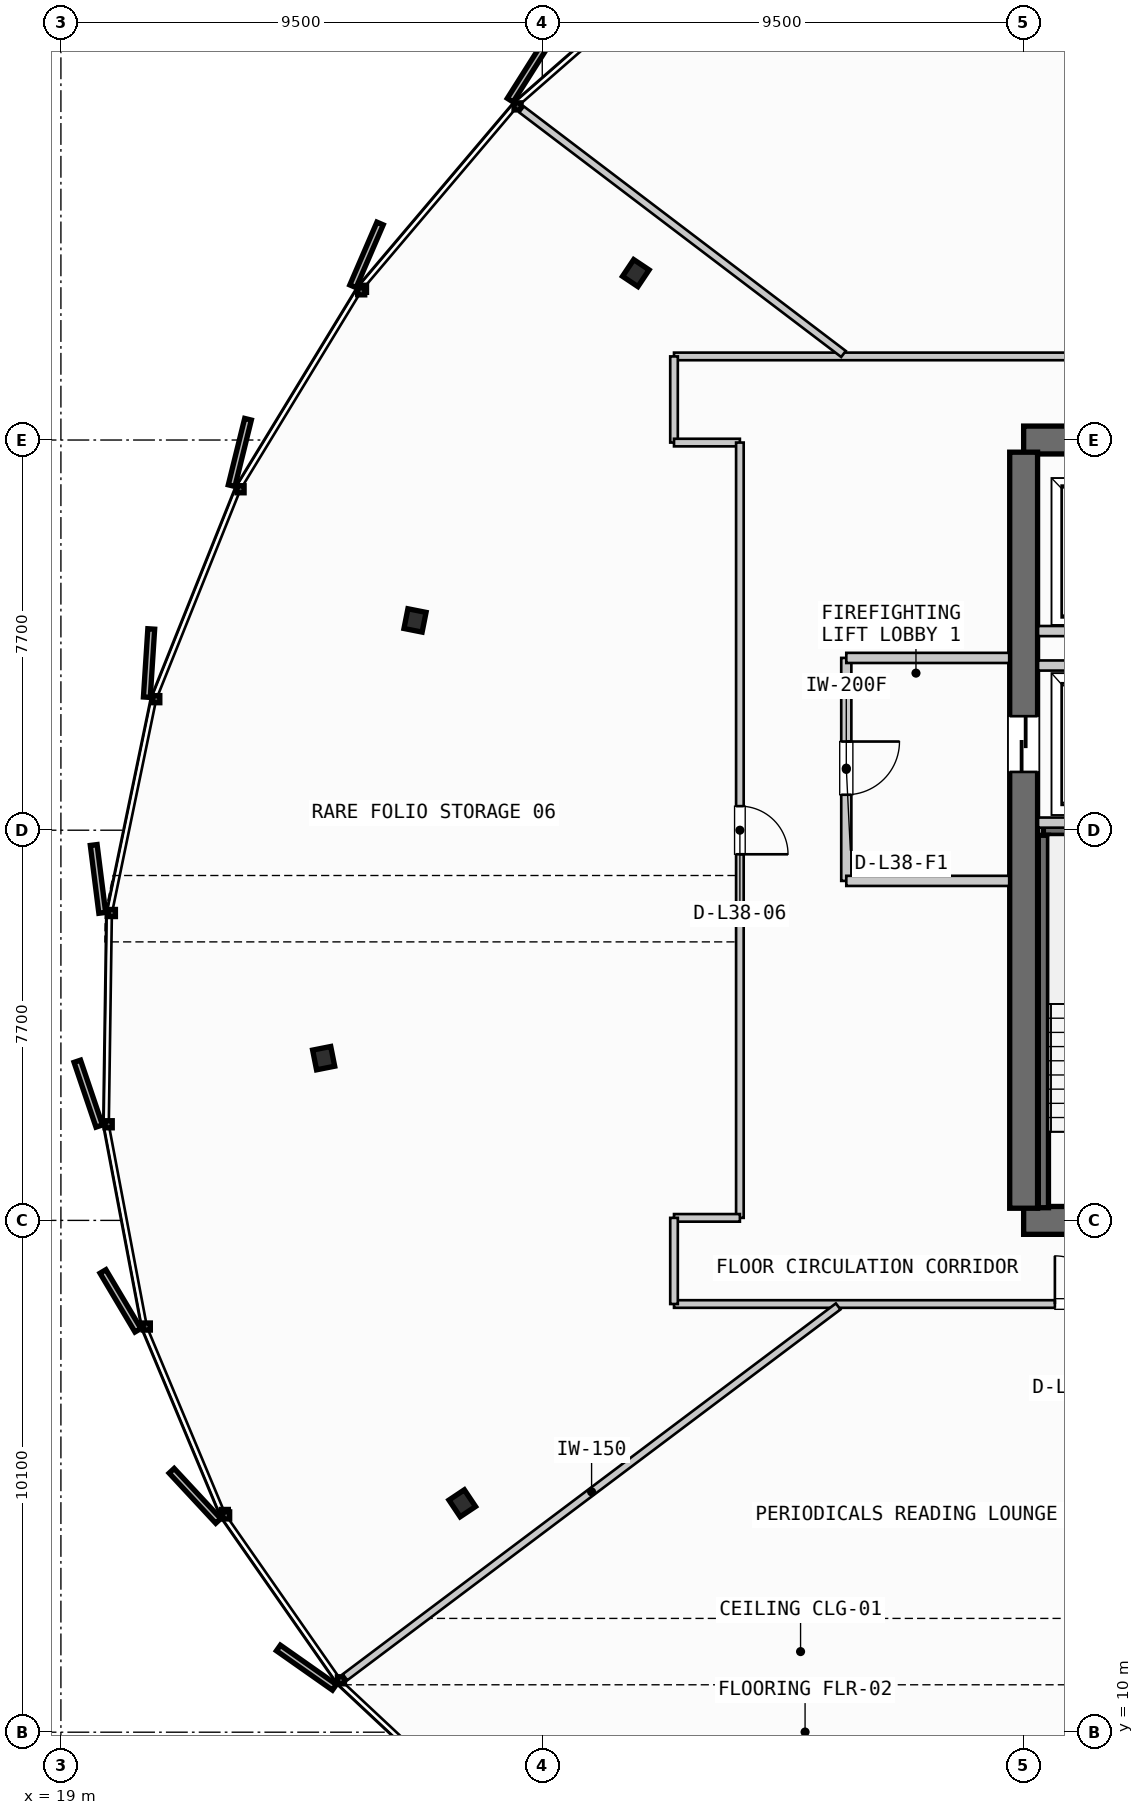
"""IFC4 building model, lengths in metres.
Left out: names, types, materials, properties, quantities, classifications, styles, units other than length and angle.
Written with IfcOpenShell. Run it as: python <this file> out.ifc"""

import sys

from ifc_helpers import new_model, si_unit, direction, frame, frame_2d, origin, origin_2d, place, context, subcontext, project, spatial, rectangle, i_section, extrude, source, transform, mapped, element, fill, save


model = new_model("IFC4")
c1 = context("Model", 3, precision=1e-05, world=origin(), true_north=direction((0.0, 1.0)))
c2 = subcontext(c1, "Body", "Model", "MODEL_VIEW")
j1 = project(units=[si_unit("LENGTHUNIT", "METRE"), si_unit("PLANEANGLEUNIT", "RADIAN")], contexts=[c1])
p1 = place(None, origin())
s1 = spatial("IfcSite", under=j1, at=p1, CompositionType="ELEMENT")
p2 = place(p1, origin())
s2 = spatial("IfcBuilding", under=s1, at=p2, CompositionType="ELEMENT")
p3 = place(p2, frame((0.0, 0.0, 150.1)))
s3 = spatial("IfcBuildingStorey", under=s2, at=p3, CompositionType="ELEMENT", Elevation=150.1)
p4 = place(p3, frame((38.0, 20.1, 0.0), z_axis=(0.0, 0.0, 1.0), x_axis=(1.0, 0.0, 0.0)))
e1 = element("IfcWall", 1, at=p4, inside=s3, PredefinedType="SHEAR", context=c2, shape_type="SweptSolid", body=[
    extrude(rectangle(XDim=17.6, YDim=0.55, at=frame_2d((8.8, 0.0))), origin(), (0.0, 0.0, 1.0), 3.3),
])
p5 = place(p4, frame((1.4, 0.0, 0.0)))
e2 = element("IfcOpeningElement", 2, at=p5, cuts=e1, PredefinedType="OPENING", context=c2, shape_type="SweptSolid", body=[
    extrude(rectangle(XDim=1.05, YDim=2.15, at=frame_2d((0.525, 1.075))), frame((0.0, 0.285, 0.0), z_axis=(0.0, -1.0, 0.0), x_axis=(1.0, 0.0, 0.0)), (0.0, 0.0, 1.0), 0.57),
])
p6 = place(p4, frame((15.15, 0.0, 0.0)))
e3 = element("IfcOpeningElement", 3, at=p6, cuts=e1, PredefinedType="OPENING", context=c2, shape_type="SweptSolid", body=[
    extrude(rectangle(XDim=1.05, YDim=2.15, at=frame_2d((0.525, 1.075))), frame((0.0, 0.285, 0.0), z_axis=(0.0, -1.0, 0.0), x_axis=(1.0, 0.0, 0.0)), (0.0, 0.0, 1.0), 0.57),
])
p7 = place(p4, frame((5.25, 0.0, 0.0)))
e4 = element("IfcOpeningElement", 4, at=p7, cuts=e1, PredefinedType="OPENING", context=c2, shape_type="SweptSolid", body=[
    extrude(rectangle(XDim=0.9, YDim=2.15, at=frame_2d((0.45, 1.075))), frame((0.0, 0.285, 0.0), z_axis=(0.0, -1.0, 0.0), x_axis=(1.0, 0.0, 0.0)), (0.0, 0.0, 1.0), 0.57),
])
p8 = place(p4, frame((11.4, 0.0, 0.0)))
e5 = element("IfcOpeningElement", 5, at=p8, cuts=e1, PredefinedType="OPENING", context=c2, shape_type="SweptSolid", body=[
    extrude(rectangle(XDim=0.95, YDim=2.15, at=frame_2d((0.475, 1.075))), frame((0.0, 0.285, 0.0), z_axis=(0.0, -1.0, 0.0), x_axis=(1.0, 0.0, 0.0)), (0.0, 0.0, 1.0), 0.57),
])
p9 = place(p3, frame((55.6, 35.5, 0.0), z_axis=(0.0, 0.0, 1.0), x_axis=(-1.0, 0.0, 0.0)))
e6 = element("IfcWall", 6, at=p9, inside=s3, PredefinedType="SHEAR", context=c2, shape_type="SweptSolid", body=[
    extrude(rectangle(XDim=17.6, YDim=0.55, at=frame_2d((8.8, 0.0))), origin(), (0.0, 0.0, 1.0), 3.3),
])
p10 = place(p9, frame((8.05, 0.0, 0.0)))
e7 = element("IfcOpeningElement", 7, at=p10, cuts=e6, PredefinedType="OPENING", context=c2, shape_type="SweptSolid", body=[
    extrude(rectangle(XDim=1.5, YDim=2.2, at=frame_2d((0.75, 1.1))), frame((0.0, 0.285, 0.0), z_axis=(0.0, -1.0, 0.0), x_axis=(1.0, 0.0, 0.0)), (0.0, 0.0, 1.0), 0.57),
])
p11 = place(p9, frame((14.95, 0.0, 0.0)))
e8 = element("IfcOpeningElement", 8, at=p11, cuts=e6, PredefinedType="OPENING", context=c2, shape_type="SweptSolid", body=[
    extrude(rectangle(XDim=1.4, YDim=2.3, at=frame_2d((0.7, 1.15))), frame((0.0, 0.285, 0.0), z_axis=(0.0, -1.0, 0.0), x_axis=(1.0, 0.0, 0.0)), (0.0, 0.0, 1.0), 0.57),
])
p12 = place(p9, frame((12.9, 0.0, 0.0)))
e9 = element("IfcOpeningElement", 9, at=p12, cuts=e6, PredefinedType="OPENING", context=c2, shape_type="SweptSolid", body=[
    extrude(rectangle(XDim=0.9, YDim=2.15, at=frame_2d((0.45, 1.075))), frame((0.0, 0.285, 0.0), z_axis=(0.0, -1.0, 0.0), x_axis=(1.0, 0.0, 0.0)), (0.0, 0.0, 1.0), 0.57),
])
p13 = place(p9, frame((10.6, 0.0, 0.0)))
e10 = element("IfcOpeningElement", 10, at=p13, cuts=e6, PredefinedType="OPENING", context=c2, shape_type="SweptSolid", body=[
    extrude(rectangle(XDim=0.95, YDim=2.15, at=frame_2d((0.475, 1.075))), frame((0.0, 0.285, 0.0), z_axis=(0.0, -1.0, 0.0), x_axis=(1.0, 0.0, 0.0)), (0.0, 0.0, 1.0), 0.57),
])
p14 = place(p3, frame((38.0, 35.26, 0.0), z_axis=(0.0, 0.0, 1.0), x_axis=(0.0, -1.0, 0.0)))
e11 = element("IfcWall", 11, at=p14, inside=s3, PredefinedType="SHEAR", context=c2, shape_type="SweptSolid", body=[
    extrude(rectangle(XDim=14.92, YDim=0.55, at=frame_2d((7.46, 0.0))), origin(), (0.0, 0.0, 1.0), 3.3),
])
p15 = place(p14, frame((5.21, 0.0, 0.0)))
e12 = element("IfcOpeningElement", 12, at=p15, cuts=e11, PredefinedType="OPENING", context=c2, shape_type="SweptSolid", body=[
    extrude(rectangle(XDim=1.1, YDim=2.2, at=frame_2d((0.55, 1.1))), frame((0.0, 0.285, 0.0), z_axis=(0.0, -1.0, 0.0), x_axis=(1.0, 0.0, 0.0)), (0.0, 0.0, 1.0), 0.57),
])
m1 = source(origin(), c2, "Body", "SweptSolid", [
    extrude(i_section(OverallWidth=0.397, OverallDepth=0.365, WebThickness=0.028, FlangeThickness=0.044, FilletRadius=0.015, at=origin_2d()), origin(), (0.0, 0.0, 1.0), 3.3),
])
for number, where, z_axis, x_axis in (
    (13, (30.346, 38.794, 0.0), (0.0, 0.0, 1.0), (-0.831, 0.556, 0.0)),
    (14, (25.989, 31.94, 0.0), (0.0, 0.0, 1.0), (-0.981, 0.195, 0.0)),
    (15, (24.185, 23.302, 0.0), (0.0, 0.0, 1.0), (-0.981, -0.195, 0.0)),
    (16, (26.921, 14.517, 0.0), (0.0, 0.0, 1.0), (-0.831, -0.556, 0.0)),
):
    element("IfcColumn", number, at=place(p3, frame(where, z_axis=z_axis, x_axis=x_axis)), inside=s3, PredefinedType="COLUMN", context=c2, shape_type="MappedRepresentation", body=[
        mapped(m1, transform((0.0, 0.0, 0.0), scale=1.0)),
    ])
p16 = place(p3, frame((38.39, 27.8, 0.0), z_axis=(0.0, 0.0, 1.0), x_axis=(1.0, 0.0, 0.0)))
e17 = element("IfcWall", 17, at=p16, inside=s3, PredefinedType="SHEAR", context=c2, shape_type="SweptSolid", body=[
    extrude(rectangle(XDim=3.06, YDim=0.2, at=frame_2d((1.53, 0.0))), origin(), (0.0, 0.0, 1.0), 3.3),
])
p17 = place(p3, frame((38.39, 20.35, 0.0), z_axis=(0.0, 0.0, 1.0), x_axis=(0.0, 1.0, 0.0)))
e18 = element("IfcWall", 18, at=p17, inside=s3, PredefinedType="SHEAR", context=c2, shape_type="SweptSolid", body=[
    extrude(rectangle(XDim=7.35, YDim=0.2, at=frame_2d((3.675, 0.0))), origin(), (0.0, 0.0, 1.0), 3.3),
])
for number, where, z_axis, x_axis in (
    (19, (38.285, 27.95, 0.0), (0.0, 0.0, 1.0), (1.0, 0.0, 0.0)),
    (20, (38.285, 31.05, 0.0), (0.0, 0.0, 1.0), (1.0, 0.0, 0.0)),
):
    element("IfcWall", number, at=place(p3, frame(where, z_axis=z_axis, x_axis=x_axis)), inside=s3, PredefinedType="PARTITIONING", context=c2, shape_type="SweptSolid", body=[
        extrude(rectangle(XDim=2.865, YDim=0.2, at=frame_2d((1.433, 0.0))), origin(), (0.0, 0.0, 1.0), 2.28),
    ])
p18 = place(p3, frame((34.5, 31.2, 0.0), z_axis=(0.0, 0.0, 1.0), x_axis=(0.0, -1.0, 0.0)))
e21 = element("IfcWall", 21, at=p18, inside=s3, PredefinedType="PARTITIONING", context=c2, shape_type="SweptSolid", body=[
    extrude(rectangle(XDim=4.4, YDim=0.2, at=frame_2d((2.2, 0.0))), origin(), (0.0, 0.0, 1.0), 2.28),
])
p19 = place(p18, frame((1.65, 0.0, 0.0)))
e22 = element("IfcOpeningElement", 22, at=p19, cuts=e21, PredefinedType="OPENING", context=c2, shape_type="SweptSolid", body=[
    extrude(rectangle(XDim=1.05, YDim=2.15, at=frame_2d((0.525, 1.075))), frame((0.0, 0.11, 0.0), z_axis=(0.0, -1.0, 0.0), x_axis=(1.0, 0.0, 0.0)), (0.0, 0.0, 1.0), 0.22),
])
for number, where, z_axis, x_axis in (
    (23, (34.5, 26.8, 0.0), (0.0, 0.0, 1.0), (1.0, 0.0, 0.0)),
    (24, (34.5, 31.2, 0.0), (0.0, 0.0, 1.0), (1.0, 0.0, 0.0)),
):
    element("IfcWall", number, at=place(p3, frame(where, z_axis=z_axis, x_axis=x_axis)), inside=s3, PredefinedType="PARTITIONING", context=c2, shape_type="SweptSolid", body=[
        extrude(rectangle(XDim=3.215, YDim=0.2, at=frame_2d((1.607, 0.0))), origin(), (0.0, 0.0, 1.0), 2.28),
    ])
p20 = place(p3, frame((38.285, 31.73, 0.0), z_axis=(0.0, 0.0, 1.0), x_axis=(1.0, 0.0, 0.0)))
e25 = element("IfcWall", 25, at=p20, inside=s3, PredefinedType="PARTITIONING", context=c2, shape_type="SweptSolid", body=[
    extrude(rectangle(XDim=7.515, YDim=0.2, at=frame_2d((3.758, 0.0))), origin(), (0.0, 0.0, 1.0), 2.28),
])
p21 = place(p3, frame((31.1, 18.45, 0.0), z_axis=(0.0, 0.0, 1.0), x_axis=(1.0, 0.0, 0.0)))
e26 = element("IfcWall", 26, at=p21, inside=s3, PredefinedType="PARTITIONING", context=c2, shape_type="SweptSolid", body=[
    extrude(rectangle(XDim=31.4, YDim=0.15, at=frame_2d((15.7, 0.0))), origin(), (0.0, 0.0, 1.0), 2.28),
])
p22 = place(p21, frame((7.517, 0.0, 0.0)))
e27 = element("IfcOpeningElement", 27, at=p22, cuts=e26, PredefinedType="OPENING", context=c2, shape_type="SweptSolid", body=[
    extrude(rectangle(XDim=0.95, YDim=2.15, at=frame_2d((0.475, 1.075))), frame((0.0, 0.085, 0.0), z_axis=(0.0, -1.0, 0.0), x_axis=(1.0, 0.0, 0.0)), (0.0, 0.0, 1.0), 0.17),
])
p23 = place(p21, frame((20.149, 0.0, 0.0)))
e28 = element("IfcOpeningElement", 28, at=p23, cuts=e26, PredefinedType="OPENING", context=c2, shape_type="SweptSolid", body=[
    extrude(rectangle(XDim=0.95, YDim=2.15, at=frame_2d((0.475, 1.075))), frame((0.0, 0.085, 0.0), z_axis=(0.0, -1.0, 0.0), x_axis=(1.0, 0.0, 0.0)), (0.0, 0.0, 1.0), 0.17),
])
p24 = place(p3, frame((62.5, 37.15, 0.0), z_axis=(0.0, 0.0, 1.0), x_axis=(-1.0, 0.0, 0.0)))
e29 = element("IfcWall", 29, at=p24, inside=s3, PredefinedType="PARTITIONING", context=c2, shape_type="SweptSolid", body=[
    extrude(rectangle(XDim=31.4, YDim=0.15, at=frame_2d((15.7, 0.0))), origin(), (0.0, 0.0, 1.0), 2.28),
])
p25 = place(p24, frame((7.179, 0.0, 0.0)))
e30 = element("IfcOpeningElement", 30, at=p25, cuts=e29, PredefinedType="OPENING", context=c2, shape_type="SweptSolid", body=[
    extrude(rectangle(XDim=0.95, YDim=2.15, at=frame_2d((0.475, 1.075))), frame((0.0, 0.085, 0.0), z_axis=(0.0, -1.0, 0.0), x_axis=(1.0, 0.0, 0.0)), (0.0, 0.0, 1.0), 0.17),
])
p26 = place(p24, frame((19.89, 0.0, 0.0)))
e31 = element("IfcOpeningElement", 31, at=p26, cuts=e29, PredefinedType="OPENING", context=c2, shape_type="SweptSolid", body=[
    extrude(rectangle(XDim=0.95, YDim=2.15, at=frame_2d((0.475, 1.075))), frame((0.0, 0.085, 0.0), z_axis=(0.0, -1.0, 0.0), x_axis=(1.0, 0.0, 0.0)), (0.0, 0.0, 1.0), 0.17),
])
p27 = place(p3, frame((31.1, 37.15, 0.0), z_axis=(0.0, 0.0, 1.0), x_axis=(0.0, -1.0, 0.0)))
e32 = element("IfcWall", 32, at=p27, inside=s3, PredefinedType="PARTITIONING", context=c2, shape_type="SweptSolid", body=[
    extrude(rectangle(XDim=1.7, YDim=0.15, at=frame_2d((0.85, 0.0))), origin(), (0.0, 0.0, 1.0), 2.28),
])
p28 = place(p3, frame((31.1, 35.45, 0.0), z_axis=(0.0, 0.0, 1.0), x_axis=(1.0, 0.0, 0.0)))
e33 = element("IfcWall", 33, at=p28, inside=s3, PredefinedType="PARTITIONING", context=c2, shape_type="SweptSolid", body=[
    extrude(rectangle(XDim=1.3, YDim=0.15, at=frame_2d((0.65, 0.0))), origin(), (0.0, 0.0, 1.0), 2.28),
])
p29 = place(p3, frame((32.4, 35.45, 0.0), z_axis=(0.0, 0.0, 1.0), x_axis=(0.0, -1.0, 0.0)))
e34 = element("IfcWall", 34, at=p29, inside=s3, PredefinedType="PARTITIONING", context=c2, shape_type="SweptSolid", body=[
    extrude(rectangle(XDim=15.3, YDim=0.15, at=frame_2d((7.65, 0.0))), origin(), (0.0, 0.0, 1.0), 2.28),
])
p30 = place(p29, frame((7.175, 0.0, 0.0)))
e35 = element("IfcOpeningElement", 35, at=p30, cuts=e34, PredefinedType="OPENING", context=c2, shape_type="SweptSolid", body=[
    extrude(rectangle(XDim=0.95, YDim=2.15, at=frame_2d((0.475, 1.075))), frame((0.0, 0.085, 0.0), z_axis=(0.0, -1.0, 0.0), x_axis=(1.0, 0.0, 0.0)), (0.0, 0.0, 1.0), 0.17),
])
p31 = place(p3, frame((32.4, 20.15, 0.0), z_axis=(0.0, 0.0, 1.0), x_axis=(-1.0, 0.0, 0.0)))
e36 = element("IfcWall", 36, at=p31, inside=s3, PredefinedType="PARTITIONING", context=c2, shape_type="SweptSolid", body=[
    extrude(rectangle(XDim=1.3, YDim=0.15, at=frame_2d((0.65, 0.0))), origin(), (0.0, 0.0, 1.0), 2.28),
])
p32 = place(p3, frame((31.1, 20.15, 0.0), z_axis=(0.0, 0.0, 1.0), x_axis=(0.0, -1.0, 0.0)))
e37 = element("IfcWall", 37, at=p32, inside=s3, PredefinedType="PARTITIONING", context=c2, shape_type="SweptSolid", body=[
    extrude(rectangle(XDim=1.7, YDim=0.15, at=frame_2d((0.85, 0.0))), origin(), (0.0, 0.0, 1.0), 2.28),
])
p33 = place(p3, frame((34.34, 18.402, 0.0), z_axis=(0.0, 0.0, 1.0), x_axis=(-0.799294488721, -0.600939531317, 0.0)))
e38 = element("IfcWall", 38, at=p33, inside=s3, PredefinedType="PARTITIONING", context=c2, shape_type="SweptSolid", body=[
    extrude(rectangle(XDim=12.177, YDim=0.15, at=frame_2d((6.088, 0.0))), origin(), (0.0, 0.0, 1.0), 2.28),
])
p34 = place(p3, frame((34.445, 37.198, 0.0), z_axis=(0.0, 0.0, 1.0), x_axis=(-0.796342033143, 0.60484656422, 0.0)))
e39 = element("IfcWall", 39, at=p34, inside=s3, PredefinedType="PARTITIONING", context=c2, shape_type="SweptSolid", body=[
    extrude(rectangle(XDim=7.977, YDim=0.15, at=frame_2d((3.989, 0.0))), origin(), (0.0, 0.0, 1.0), 2.28),
])
m2 = source(origin(), c2, "Body", "SweptSolid", [
    extrude(rectangle(XDim=1.1, YDim=2.2, at=frame_2d((0.55, 1.1))), frame((0.0, 0.025, 0.0), z_axis=(0.0, -1.0, 0.0), x_axis=(1.0, 0.0, 0.0)), (0.0, 0.0, 1.0), 0.05),
])
p35 = place(p15, origin())
e40 = element("IfcDoor", 40, at=p35, inside=s3, OperationType="SLIDING_TO_LEFT", PredefinedType="DOOR", context=c2, shape_type="MappedRepresentation", body=[
    mapped(m2, transform((0.0, 0.0, 0.0), scale=1.0)),
])
fill(e12, e40)
m3 = source(origin(), c2, "Body", "SweptSolid", [
    extrude(rectangle(XDim=1.05, YDim=2.15, at=frame_2d((0.525, 1.075))), frame((0.0, 0.025, 0.0), z_axis=(0.0, -1.0, 0.0), x_axis=(1.0, 0.0, 0.0)), (0.0, 0.0, 1.0), 0.05),
])
p36 = place(p19, origin())
e41 = element("IfcDoor", 41, at=p36, inside=s3, OperationType="SINGLE_SWING_LEFT", PredefinedType="DOOR", context=c2, shape_type="MappedRepresentation", body=[
    mapped(m3, transform((0.0, 0.0, 0.0), scale=1.0)),
])
fill(e22, e41)
m4 = source(origin(), c2, "Body", "SweptSolid", [
    extrude(rectangle(XDim=0.95, YDim=2.15, at=frame_2d((0.475, 1.075))), frame((0.0, 0.025, 0.0), z_axis=(0.0, -1.0, 0.0), x_axis=(1.0, 0.0, 0.0)), (0.0, 0.0, 1.0), 0.05),
])
p37 = place(p22, origin())
e42 = element("IfcDoor", 42, at=p37, inside=s3, OperationType="SINGLE_SWING_LEFT", PredefinedType="DOOR", context=c2, shape_type="MappedRepresentation", body=[
    mapped(m4, transform((0.0, 0.0, 0.0), scale=1.0)),
])
fill(e27, e42)
p38 = place(p30, origin())
e43 = element("IfcDoor", 43, at=p38, inside=s3, OperationType="SINGLE_SWING_RIGHT", PredefinedType="DOOR", context=c2, shape_type="MappedRepresentation", body=[
    mapped(m4, transform((0.0, 0.0, 0.0), scale=1.0)),
])
fill(e35, e43)
save(model, sys.argv[1])
